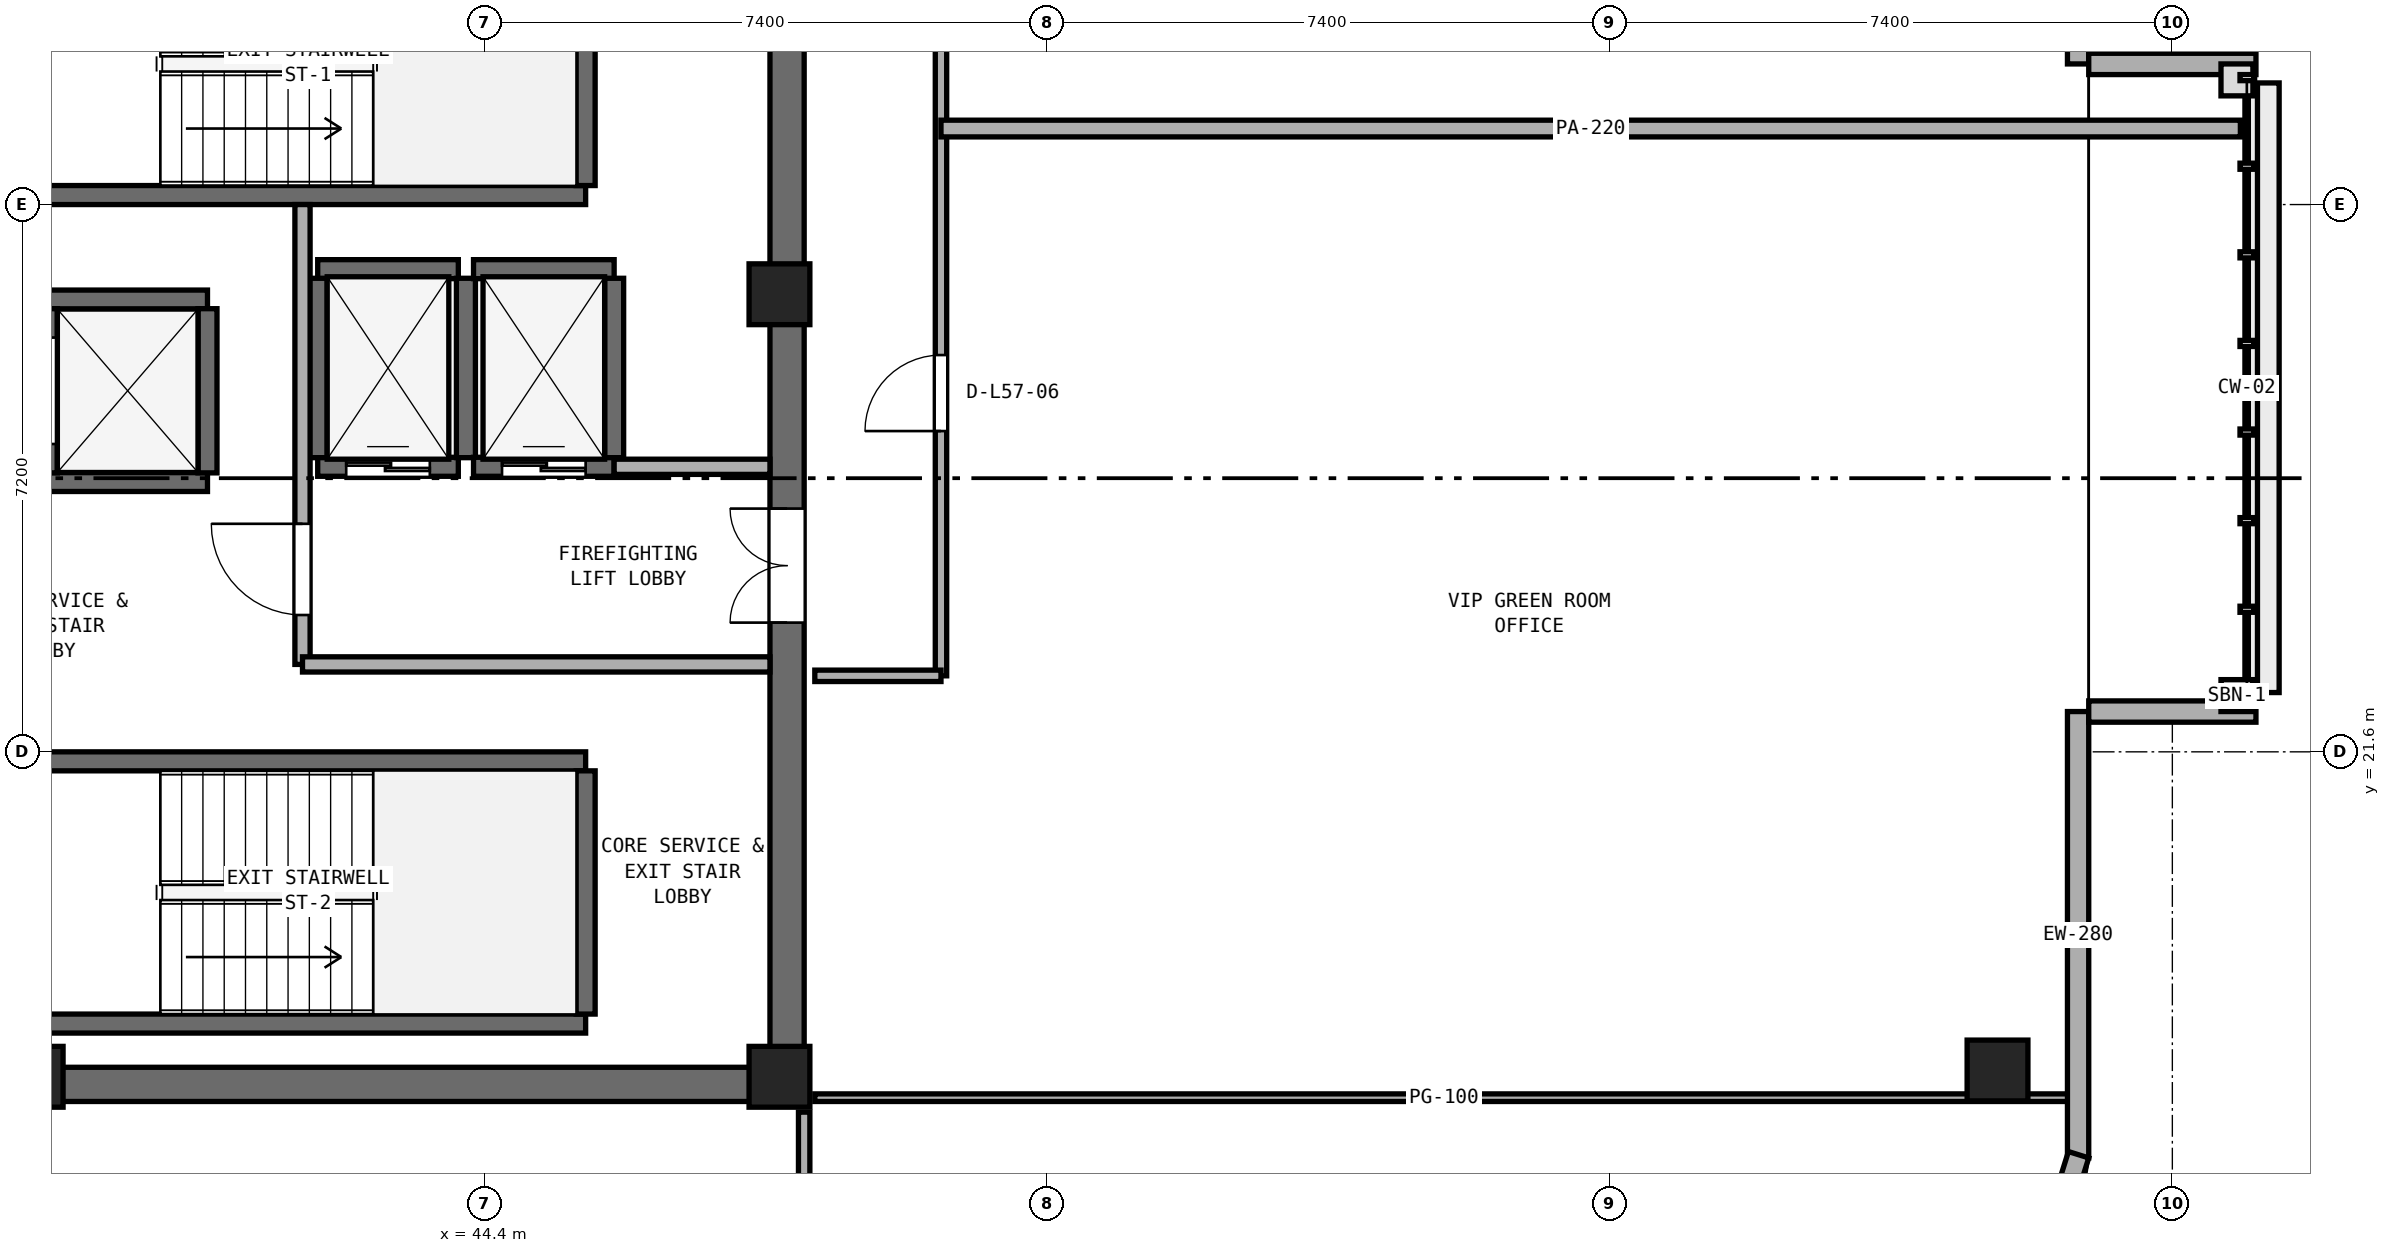
"""IFC4 building model, lengths in metres.
Left out: names, types, materials, properties, quantities, classifications, styles, units other than length and angle.
Written with IfcOpenShell. Run it as: python <this file> out.ifc"""

import sys

from ifc_helpers import new_model, si_unit, direction, frame, frame_2d, origin, origin_2d, place, context, subcontext, project, spatial, rectangle, extrude, element, fill, save


model = new_model("IFC4")
c1 = context("Model", 3, precision=1e-05, world=origin(), true_north=direction((0.0, 1.0)))
c2 = subcontext(c1, "Body", "Model", "MODEL_VIEW")
j1 = project(units=[si_unit("LENGTHUNIT", "METRE"), si_unit("PLANEANGLEUNIT", "RADIAN")], contexts=[c1])
p1 = place(None, origin())
s1 = spatial("IfcSite", under=j1, at=p1, CompositionType="ELEMENT")
p2 = place(p1, origin())
s2 = spatial("IfcBuilding", under=s1, at=p2, CompositionType="ELEMENT")
p3 = place(p2, frame((0.0, 0.0, 225.0)))
s3 = spatial("IfcBuildingStorey", under=s2, at=p3, CompositionType="ELEMENT", Elevation=225.0)
p4 = place(p3, frame((25.4, 17.225, 0.0), z_axis=(0.0, 0.0, 1.0), x_axis=(1.0, 0.0, 0.0)))
e1 = element("IfcWall", 1, at=p4, inside=s3, PredefinedType="SHEAR", context=c2, shape_type="SweptSolid", body=[
    extrude(rectangle(XDim=23.2, YDim=0.45, at=frame_2d((11.6, 0.0))), origin(), (0.0, 0.0, 1.0), 3.51),
])
p5 = place(p3, frame((48.375, 17.45, 0.0), z_axis=(0.0, 0.0, 1.0), x_axis=(0.0, 1.0, 0.0)))
e2 = element("IfcWall", 2, at=p5, inside=s3, PredefinedType="SHEAR", context=c2, shape_type="SweptSolid", body=[
    extrude(rectangle(XDim=15.5, YDim=0.45, at=frame_2d((7.75, 0.0))), origin(), (0.0, 0.0, 1.0), 3.51),
])
p6 = place(p5, frame((5.85, 0.0, 0.0)))
e3 = element("IfcOpeningElement", 3, at=p6, cuts=e2, PredefinedType="OPENING", context=c2, shape_type="SweptSolid", body=[
    extrude(rectangle(XDim=1.5, YDim=2.15, at=frame_2d((0.75, 1.075))), frame((0.0, 0.235, 0.0), z_axis=(0.0, -1.0, 0.0), x_axis=(1.0, 0.0, 0.0)), (0.0, 0.0, 1.0), 0.47),
])
for number, where, z_axis, x_axis in (
    (4, (38.45, 17.325, 0.0), (0.0, 0.0, 1.0), (1.0, 0.0, 0.0)),
    (5, (48.275, 17.325, 0.0), (0.0, 0.0, 1.0), (1.0, 0.0, 0.0)),
    (6, (48.275, 27.62, 0.0), (0.0, 0.0, 1.0), (1.0, 0.0, 0.0)),
):
    element("IfcColumn", number, at=place(p3, frame(where, z_axis=z_axis, x_axis=x_axis)), inside=s3, PredefinedType="PILASTER", context=c2, shape_type="SweptSolid", body=[
        extrude(rectangle(XDim=0.8, YDim=0.8, at=origin_2d()), origin(), (0.0, 0.0, 1.0), 3.8),
    ])
p7 = place(p3, frame((64.3, 17.408, 0.0), z_axis=(0.0, 0.0, 1.0), x_axis=(1.0, 0.0, 0.0)))
e7 = element("IfcColumn", 7, at=p7, inside=s3, PredefinedType="COLUMN", context=c2, shape_type="SweptSolid", body=[
    extrude(rectangle(XDim=0.8, YDim=0.8, at=origin_2d()), origin(), (0.0, 0.0, 1.0), 3.8),
])
p8 = place(p3, frame((38.425, 28.925, 0.0), z_axis=(0.0, 0.0, 1.0), x_axis=(1.0, 0.0, 0.0)))
e8 = element("IfcWall", 8, at=p8, inside=s3, PredefinedType="SHEAR", context=c2, shape_type="SweptSolid", body=[
    extrude(rectangle(XDim=7.3, YDim=0.25, at=frame_2d((3.65, 0.0))), origin(), (0.0, 0.0, 1.0), 3.51),
])
p9 = place(p3, frame((45.725, 29.05, 0.0), z_axis=(0.0, 0.0, 1.0), x_axis=(0.0, 1.0, 0.0)))
e9 = element("IfcWall", 9, at=p9, inside=s3, PredefinedType="SHEAR", context=c2, shape_type="SweptSolid", body=[
    extrude(rectangle(XDim=3.2, YDim=0.25, at=frame_2d((1.6, 0.0))), origin(), (0.0, 0.0, 1.0), 3.51),
])
for number, where, z_axis, x_axis in (
    (10, (38.425, 18.025, 0.0), (0.0, 0.0, 1.0), (1.0, 0.0, 0.0)),
    (11, (38.425, 21.475, 0.0), (0.0, 0.0, 1.0), (1.0, 0.0, 0.0)),
):
    element("IfcWall", number, at=place(p3, frame(where, z_axis=z_axis, x_axis=x_axis)), inside=s3, PredefinedType="SHEAR", context=c2, shape_type="SweptSolid", body=[
        extrude(rectangle(XDim=7.3, YDim=0.25, at=frame_2d((3.65, 0.0))), origin(), (0.0, 0.0, 1.0), 3.51),
    ])
p10 = place(p3, frame((45.725, 18.15, 0.0), z_axis=(0.0, 0.0, 1.0), x_axis=(0.0, 1.0, 0.0)))
e12 = element("IfcWall", 12, at=p10, inside=s3, PredefinedType="SHEAR", context=c2, shape_type="SweptSolid", body=[
    extrude(rectangle(XDim=3.2, YDim=0.25, at=frame_2d((1.6, 0.0))), origin(), (0.0, 0.0, 1.0), 3.51),
])
p11 = place(p3, frame((42.2, 25.35, 0.0), z_axis=(0.0, 0.0, 1.0), x_axis=(1.0, 0.0, 0.0)))
e13 = element("IfcWall", 13, at=p11, inside=s3, PredefinedType="SHEAR", context=c2, shape_type="SweptSolid", body=[
    extrude(rectangle(XDim=1.85, YDim=0.25, at=frame_2d((0.925, 0.0))), origin(), (0.0, 0.0, 1.0), 3.51),
])
p12 = place(p11, frame((0.375, 0.0, 0.0)))
e14 = element("IfcOpeningElement", 14, at=p12, cuts=e13, PredefinedType="OPENING", context=c2, shape_type="SweptSolid", body=[
    extrude(rectangle(XDim=1.1, YDim=2.15, at=frame_2d((0.55, 1.075))), frame((0.0, 0.135, 0.0), z_axis=(0.0, -1.0, 0.0), x_axis=(1.0, 0.0, 0.0)), (0.0, 0.0, 1.0), 0.27),
])
p13 = place(p3, frame((42.2, 27.95, 0.0), z_axis=(0.0, 0.0, 1.0), x_axis=(1.0, 0.0, 0.0)))
e15 = element("IfcWall", 15, at=p13, inside=s3, PredefinedType="SHEAR", context=c2, shape_type="SweptSolid", body=[
    extrude(rectangle(XDim=1.85, YDim=0.25, at=frame_2d((0.925, 0.0))), origin(), (0.0, 0.0, 1.0), 3.51),
])
for number, where, z_axis, x_axis in (
    (16, (42.2, 25.47, 0.0), (0.0, 0.0, 1.0), (0.0, 1.0, 0.0)),
    (17, (44.15, 25.47, 0.0), (0.0, 0.0, 1.0), (0.0, 1.0, 0.0)),
):
    element("IfcWall", number, at=place(p3, frame(where, z_axis=z_axis, x_axis=x_axis)), inside=s3, PredefinedType="SHEAR", context=c2, shape_type="SweptSolid", body=[
        extrude(rectangle(XDim=2.36, YDim=0.25, at=frame_2d((1.18, 0.0))), origin(), (0.0, 0.0, 1.0), 3.51),
    ])
p14 = place(p3, frame((44.25, 25.35, 0.0), z_axis=(0.0, 0.0, 1.0), x_axis=(1.0, 0.0, 0.0)))
e18 = element("IfcWall", 18, at=p14, inside=s3, PredefinedType="SHEAR", context=c2, shape_type="SweptSolid", body=[
    extrude(rectangle(XDim=1.85, YDim=0.25, at=frame_2d((0.925, 0.0))), origin(), (0.0, 0.0, 1.0), 3.51),
])
p15 = place(p14, frame((0.375, 0.0, 0.0)))
e19 = element("IfcOpeningElement", 19, at=p15, cuts=e18, PredefinedType="OPENING", context=c2, shape_type="SweptSolid", body=[
    extrude(rectangle(XDim=1.1, YDim=2.15, at=frame_2d((0.55, 1.075))), frame((0.0, 0.135, 0.0), z_axis=(0.0, -1.0, 0.0), x_axis=(1.0, 0.0, 0.0)), (0.0, 0.0, 1.0), 0.27),
])
p16 = place(p3, frame((44.25, 27.95, 0.0), z_axis=(0.0, 0.0, 1.0), x_axis=(1.0, 0.0, 0.0)))
e20 = element("IfcWall", 20, at=p16, inside=s3, PredefinedType="SHEAR", context=c2, shape_type="SweptSolid", body=[
    extrude(rectangle(XDim=1.85, YDim=0.25, at=frame_2d((0.925, 0.0))), origin(), (0.0, 0.0, 1.0), 3.51),
])
p17 = place(p3, frame((46.1, 25.47, 0.0), z_axis=(0.0, 0.0, 1.0), x_axis=(0.0, 1.0, 0.0)))
e21 = element("IfcWall", 21, at=p17, inside=s3, PredefinedType="SHEAR", context=c2, shape_type="SweptSolid", body=[
    extrude(rectangle(XDim=2.36, YDim=0.25, at=frame_2d((1.18, 0.0))), origin(), (0.0, 0.0, 1.0), 3.51),
])
for number, where, z_axis, x_axis in (
    (22, (38.65, 25.15, 0.0), (0.0, 0.0, 1.0), (1.0, 0.0, 0.0)),
    (23, (38.65, 27.55, 0.0), (0.0, 0.0, 1.0), (1.0, 0.0, 0.0)),
):
    element("IfcWall", number, at=place(p3, frame(where, z_axis=z_axis, x_axis=x_axis)), inside=s3, PredefinedType="SHEAR", context=c2, shape_type="SweptSolid", body=[
        extrude(rectangle(XDim=2.1, YDim=0.25, at=frame_2d((1.05, 0.0))), origin(), (0.0, 0.0, 1.0), 3.51),
    ])
p18 = place(p3, frame((38.65, 25.27, 0.0), z_axis=(0.0, 0.0, 1.0), x_axis=(0.0, 1.0, 0.0)))
e24 = element("IfcWall", 24, at=p18, inside=s3, PredefinedType="SHEAR", context=c2, shape_type="SweptSolid", body=[
    extrude(rectangle(XDim=2.16, YDim=0.25, at=frame_2d((1.08, 0.0))), origin(), (0.0, 0.0, 1.0), 3.51),
])
p19 = place(p18, frame((0.38, 0.0, 0.0)))
e25 = element("IfcOpeningElement", 25, at=p19, cuts=e24, PredefinedType="OPENING", context=c2, shape_type="SweptSolid", body=[
    extrude(rectangle(XDim=1.4, YDim=2.2, at=frame_2d((0.7, 1.1))), frame((0.0, 0.135, 0.0), z_axis=(0.0, -1.0, 0.0), x_axis=(1.0, 0.0, 0.0)), (0.0, 0.0, 1.0), 0.27),
])
p20 = place(p3, frame((40.75, 25.27, 0.0), z_axis=(0.0, 0.0, 1.0), x_axis=(0.0, 1.0, 0.0)))
e26 = element("IfcWall", 26, at=p20, inside=s3, PredefinedType="SHEAR", context=c2, shape_type="SweptSolid", body=[
    extrude(rectangle(XDim=2.16, YDim=0.25, at=frame_2d((1.08, 0.0))), origin(), (0.0, 0.0, 1.0), 3.51),
])
p21 = place(p3, frame((42.0, 22.75, 0.0), z_axis=(0.0, 0.0, 1.0), x_axis=(0.0, 1.0, 0.0)))
e27 = element("IfcWall", 27, at=p21, inside=s3, PredefinedType="SOLIDWALL", context=c2, shape_type="SweptSolid", body=[
    extrude(rectangle(XDim=6.05, YDim=0.2, at=frame_2d((3.025, 0.0))), origin(), (0.0, 0.0, 1.0), 3.51),
])
p22 = place(p21, frame((0.65, 0.0, 0.0)))
e28 = element("IfcOpeningElement", 28, at=p22, cuts=e27, PredefinedType="OPENING", context=c2, shape_type="SweptSolid", body=[
    extrude(rectangle(XDim=1.2, YDim=2.15, at=frame_2d((0.6, 1.075))), frame((0.0, 0.11, 0.0), z_axis=(0.0, -1.0, 0.0), x_axis=(1.0, 0.0, 0.0)), (0.0, 0.0, 1.0), 0.22),
])
p23 = place(p3, frame((42.0, 22.75, 0.0), z_axis=(0.0, 0.0, 1.0), x_axis=(1.0, 0.0, 0.0)))
e29 = element("IfcWall", 29, at=p23, inside=s3, PredefinedType="SOLIDWALL", context=c2, shape_type="SweptSolid", body=[
    extrude(rectangle(XDim=6.15, YDim=0.2, at=frame_2d((3.075, 0.0))), origin(), (0.0, 0.0, 1.0), 3.51),
])
p24 = place(p3, frame((46.1, 25.35, 0.0), z_axis=(0.0, 0.0, 1.0), x_axis=(1.0, 0.0, 0.0)))
e30 = element("IfcWall", 30, at=p24, inside=s3, PredefinedType="SOLIDWALL", context=c2, shape_type="SweptSolid", body=[
    extrude(rectangle(XDim=2.05, YDim=0.2, at=frame_2d((1.025, 0.0))), origin(), (0.0, 0.0, 1.0), 3.51),
])
p25 = place(p3, frame((50.4, 22.6, 0.0), z_axis=(0.0, 0.0, 1.0), x_axis=(0.0, 1.0, 0.0)))
e31 = element("IfcWall", 31, at=p25, inside=s3, PredefinedType="PARTITIONING", context=c2, shape_type="SweptSolid", body=[
    extrude(rectangle(XDim=12.6, YDim=0.15, at=frame_2d((6.3, 0.0))), origin(), (0.0, 0.0, 1.0), 3.51),
])
p26 = place(p25, frame((3.22, 0.0, 0.0)))
e32 = element("IfcOpeningElement", 32, at=p26, cuts=e31, PredefinedType="OPENING", context=c2, shape_type="SweptSolid", body=[
    extrude(rectangle(XDim=1.0, YDim=2.12, at=frame_2d((0.5, 1.06))), frame((0.0, 0.085, 0.0), z_axis=(0.0, -1.0, 0.0), x_axis=(1.0, 0.0, 0.0)), (0.0, 0.0, 1.0), 0.17),
])
p27 = place(p25, frame((8.525, 0.0, 0.0)))
e33 = element("IfcOpeningElement", 33, at=p27, cuts=e31, PredefinedType="OPENING", context=c2, shape_type="SweptSolid", body=[
    extrude(rectangle(XDim=0.9, YDim=2.1, at=frame_2d((0.45, 1.05))), frame((0.0, 0.085, 0.0), z_axis=(0.0, -1.0, 0.0), x_axis=(1.0, 0.0, 0.0)), (0.0, 0.0, 1.0), 0.17),
])
p28 = place(p3, frame((48.6, 15.2, 0.0), z_axis=(0.0, 0.0, 1.0), x_axis=(0.0, 1.0, 0.0)))
e34 = element("IfcWall", 34, at=p28, inside=s3, PredefinedType="PARTITIONING", context=c2, shape_type="SweptSolid", body=[
    extrude(rectangle(XDim=1.66, YDim=0.15, at=frame_2d((0.83, 0.0))), origin(), (0.0, 0.0, 1.0), 2.893),
])
p29 = place(p3, frame((48.74, 17.05, 0.0), z_axis=(0.0, 0.0, 1.0), x_axis=(1.0, 0.0, 0.0)))
e35 = element("IfcWall", 35, at=p29, inside=s3, PredefinedType="PARTITIONING", context=c2, shape_type="SweptSolid", body=[
    extrude(rectangle(XDim=16.555, YDim=0.1, at=frame_2d((8.277, 0.0))), origin(), (0.0, 0.0, 1.0), 2.893),
])
p30 = place(p3, frame((48.74, 22.6, 0.0), z_axis=(0.0, 0.0, 1.0), x_axis=(1.0, 0.0, 0.0)))
e36 = element("IfcWall", 36, at=p30, inside=s3, PredefinedType="PARTITIONING", context=c2, shape_type="SweptSolid", body=[
    extrude(rectangle(XDim=1.66, YDim=0.15, at=frame_2d((0.83, 0.0))), origin(), (0.0, 0.0, 1.0), 3.51),
])
p31 = place(p3, frame((50.4, 29.8, 0.0), z_axis=(0.0, 0.0, 1.0), x_axis=(1.0, 0.0, 0.0)))
e37 = element("IfcWall", 37, at=p31, inside=s3, PredefinedType="PARTITIONING", context=c2, shape_type="SweptSolid", body=[
    extrude(rectangle(XDim=17.095, YDim=0.22, at=frame_2d((8.548, 0.0))), origin(), (0.0, 0.0, 1.0), 3.51),
])
p32 = place(p3, frame((65.36, 16.258, 0.0), z_axis=(0.0, 0.0, 1.0), x_axis=(0.0, 1.0, 0.0)))
e38 = element("IfcWall", 38, at=p32, inside=s3, PredefinedType="STANDARD", context=c2, shape_type="SweptSolid", body=[
    extrude(rectangle(XDim=5.872, YDim=0.28, at=frame_2d((2.936, 0.0))), origin(), (0.0, 0.0, 1.0), 3.51),
])
p33 = place(p3, frame((65.36, 30.65, 0.0), z_axis=(0.0, 0.0, 1.0), x_axis=(0.0, 1.0, 0.0)))
e39 = element("IfcWall", 39, at=p33, inside=s3, PredefinedType="STANDARD", context=c2, shape_type="SweptSolid", body=[
    extrude(rectangle(XDim=4.776, YDim=0.28, at=frame_2d((2.388, 0.0))), origin(), (0.0, 0.0, 1.0), 3.51),
])
p34 = place(p3, frame((64.635, 13.962, 0.0), z_axis=(0.0, 0.0, 1.0), x_axis=(0.298649578722, 0.954362839348, 0.0)))
e40 = element("IfcWall", 40, at=p34, inside=s3, PredefinedType="STANDARD", context=c2, shape_type="SweptSolid", body=[
    extrude(rectangle(XDim=2.449, YDim=0.28, at=frame_2d((1.225, 0.0))), origin(), (0.0, 0.0, 1.0), 3.51),
])
for number, where, z_axis, x_axis in (
    (41, (65.5, 22.13, 0.0), (0.0, 0.0, 1.0), (1.0, 0.0, 0.0)),
    (42, (65.5, 30.65, 0.0), (0.0, 0.0, 1.0), (1.0, 0.0, 0.0)),
):
    element("IfcWall", number, at=place(p3, frame(where, z_axis=z_axis, x_axis=x_axis)), inside=s3, PredefinedType="STANDARD", context=c2, shape_type="SweptSolid", body=[
        extrude(rectangle(XDim=2.2, YDim=0.28, at=frame_2d((1.1, 0.0))), origin(), (0.0, 0.0, 1.0), 3.51),
    ])
p35 = place(p12, origin())
e43 = element("IfcDoor", 43, at=p35, inside=s3, OperationType="DOUBLE_DOOR_SLIDING", PredefinedType="DOOR", context=c2, shape_type="SweptSolid", body=[
    extrude(rectangle(XDim=1.1, YDim=2.15, at=frame_2d((0.55, 1.075))), frame((0.0, 0.025, 0.0), z_axis=(0.0, -1.0, 0.0), x_axis=(1.0, 0.0, 0.0)), (0.0, 0.0, 1.0), 0.05),
])
fill(e14, e43)
p36 = place(p15, origin())
e44 = element("IfcDoor", 44, at=p36, inside=s3, OperationType="DOUBLE_DOOR_SLIDING", PredefinedType="DOOR", context=c2, shape_type="SweptSolid", body=[
    extrude(rectangle(XDim=1.1, YDim=2.15, at=frame_2d((0.55, 1.075))), frame((0.0, 0.025, 0.0), z_axis=(0.0, -1.0, 0.0), x_axis=(1.0, 0.0, 0.0)), (0.0, 0.0, 1.0), 0.05),
])
fill(e19, e44)
p37 = place(p22, origin())
e45 = element("IfcDoor", 45, at=p37, inside=s3, OperationType="SINGLE_SWING_RIGHT", PredefinedType="DOOR", context=c2, shape_type="SweptSolid", body=[
    extrude(rectangle(XDim=1.2, YDim=2.15, at=frame_2d((0.6, 1.075))), frame((0.0, 0.025, 0.0), z_axis=(0.0, -1.0, 0.0), x_axis=(1.0, 0.0, 0.0)), (0.0, 0.0, 1.0), 0.05),
])
fill(e28, e45)
p38 = place(p6, origin())
e46 = element("IfcDoor", 46, at=p38, inside=s3, OperationType="DOUBLE_DOOR_SINGLE_SWING", PredefinedType="DOOR", context=c2, shape_type="SweptSolid", body=[
    extrude(rectangle(XDim=1.5, YDim=2.15, at=frame_2d((0.75, 1.075))), frame((0.0, 0.025, 0.0), z_axis=(0.0, -1.0, 0.0), x_axis=(1.0, 0.0, 0.0)), (0.0, 0.0, 1.0), 0.05),
])
fill(e3, e46)
p39 = place(p26, origin())
e47 = element("IfcDoor", 47, at=p39, inside=s3, OperationType="SINGLE_SWING_LEFT", PredefinedType="DOOR", context=c2, shape_type="SweptSolid", body=[
    extrude(rectangle(XDim=1.0, YDim=2.12, at=frame_2d((0.5, 1.06))), frame((0.0, 0.025, 0.0), z_axis=(0.0, -1.0, 0.0), x_axis=(1.0, 0.0, 0.0)), (0.0, 0.0, 1.0), 0.05),
])
fill(e32, e47)
save(model, sys.argv[1])
